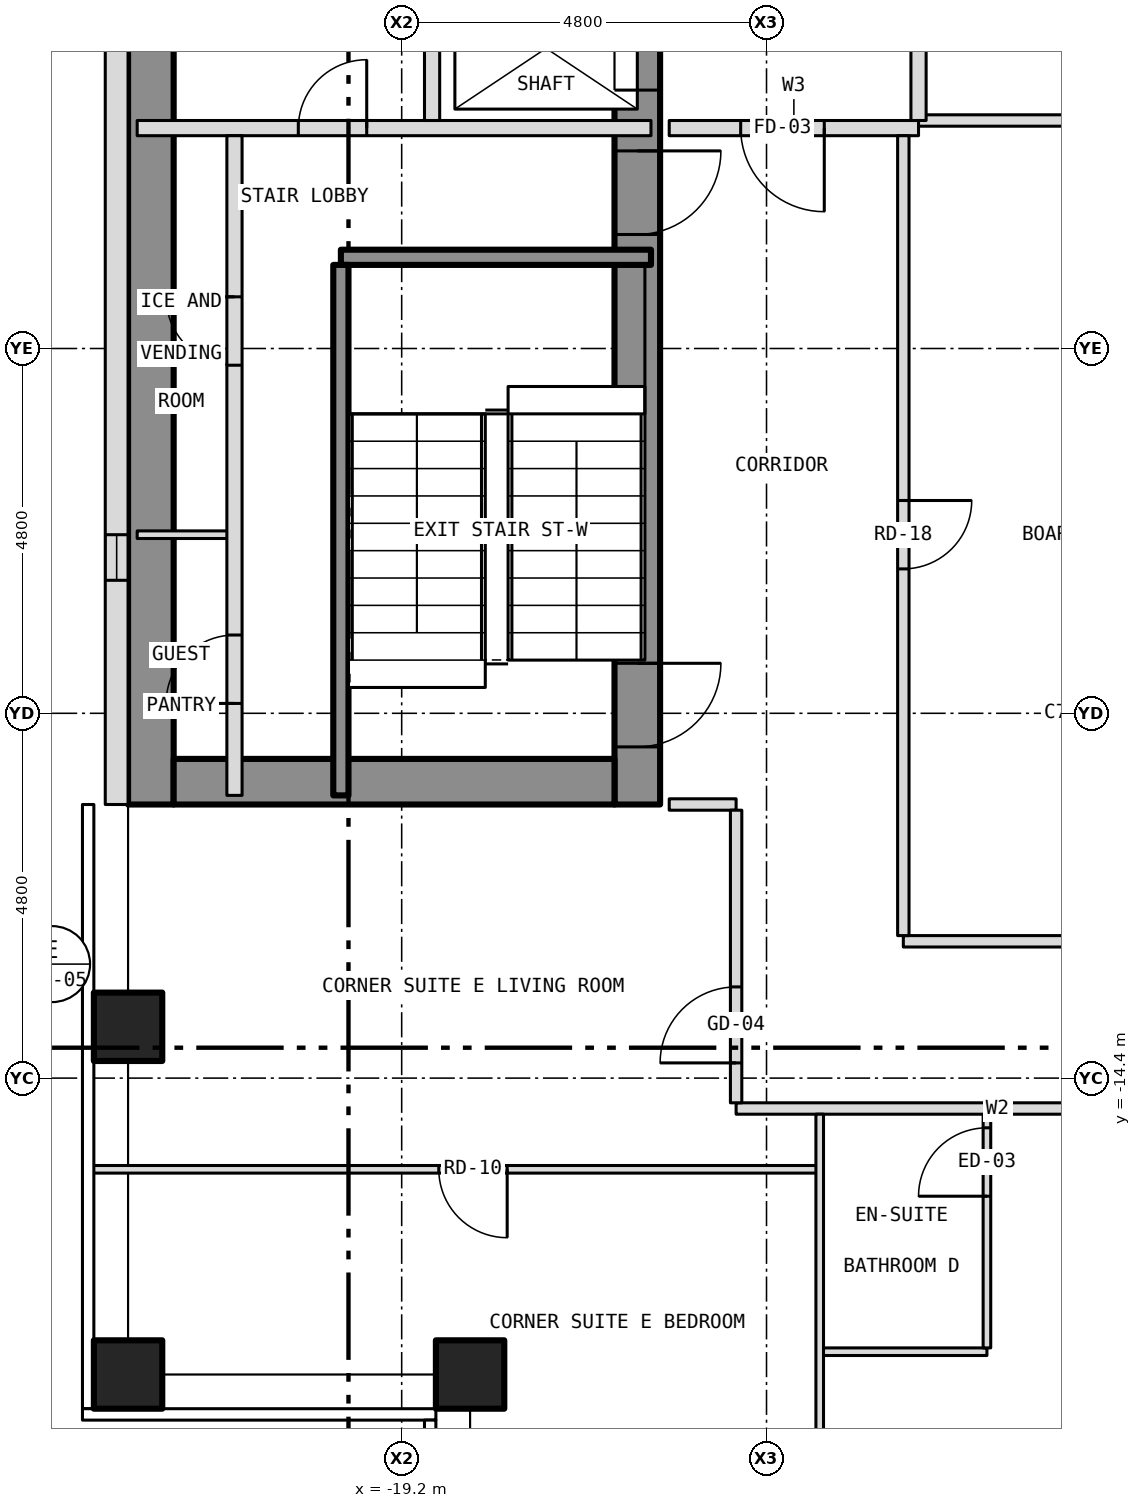
"""IFC4 building model, lengths in metres.
Left out: names, types, materials, properties, quantities, classifications, styles, units other than length and angle.
Written with IfcOpenShell. Run it as: python <this file> out.ifc"""

import sys

from ifc_helpers import new_model, si_unit, direction, frame, frame_2d, origin, origin_2d, place, context, subcontext, project, spatial, rectangle, hollow_rectangle, extrude, element, fill, save


model = new_model("IFC4")
c1 = context("Model", 3, precision=1e-05, world=origin(), true_north=direction((0.0, 1.0)))
c2 = subcontext(c1, "Body", "Model", "MODEL_VIEW")
j1 = project(units=[si_unit("LENGTHUNIT", "METRE"), si_unit("PLANEANGLEUNIT", "RADIAN")], contexts=[c1])
p1 = place(None, origin())
s1 = spatial("IfcSite", under=j1, at=p1, CompositionType="ELEMENT")
p2 = place(p1, origin())
s2 = spatial("IfcBuilding", under=s1, at=p2, CompositionType="ELEMENT")
p3 = place(p2, frame((0.0, 0.0, 134.5)))
s3 = spatial("IfcBuildingStorey", under=s2, at=p3, CompositionType="ELEMENT", Elevation=134.5)
for number, where, z_axis, x_axis in (
    (1, (-22.8, -18.3, -0.15), (0.0, 0.0, 1.0), (1.0, 0.0, 0.0)),
    (2, (-22.8, -13.725, -0.15), (0.0, 0.0, 1.0), (1.0, 0.0, 0.0)),
    (3, (-18.3, -18.3, -0.15), (0.0, 0.0, 1.0), (1.0, 0.0, 0.0)),
):
    element("IfcColumn", number, at=place(p3, frame(where, z_axis=z_axis, x_axis=x_axis)), inside=s3, PredefinedType="COLUMN", context=c2, shape_type="SweptSolid", body=[
        extrude(hollow_rectangle(XDim=0.9, YDim=0.9, WallThickness=0.05, at=origin_2d()), origin(), (0.0, 0.0, 1.0), 3.35),
    ])
p4 = place(p3, frame((-16.1, -10.8, 0.0), z_axis=(0.0, 0.0, 1.0), x_axis=(0.0, 1.0, 0.0)))
e4 = element("IfcWall", 4, at=p4, inside=s3, PredefinedType="SHEAR", context=c2, shape_type="SweptSolid", body=[
    extrude(rectangle(XDim=21.6, YDim=0.6, at=frame_2d((10.8, 0.0))), origin(), (0.0, 0.0, 1.0), 2.9),
])
p5 = place(p4, frame((9.4, 0.0, 0.0)))
e5 = element("IfcOpeningElement", 5, at=p5, cuts=e4, PredefinedType="OPENING", context=c2, shape_type="SweptSolid", body=[
    extrude(rectangle(XDim=1.1, YDim=2.1, at=frame_2d((0.55, 1.05))), frame((0.0, 0.312, 0.0), z_axis=(0.0, -1.0, 0.0), x_axis=(1.0, 0.0, 0.0)), (0.0, 0.0, 1.0), 0.624),
])
p6 = place(p4, frame((11.5, 0.0, 0.0)))
e6 = element("IfcOpeningElement", 6, at=p6, cuts=e4, PredefinedType="OPENING", context=c2, shape_type="SweptSolid", body=[
    extrude(rectangle(XDim=1.1, YDim=2.1, at=frame_2d((0.55, 1.05))), frame((0.0, 0.312, 0.0), z_axis=(0.0, -1.0, 0.0), x_axis=(1.0, 0.0, 0.0)), (0.0, 0.0, 1.0), 0.624),
])
p7 = place(p4, frame((13.6, 0.0, 0.0)))
e7 = element("IfcOpeningElement", 7, at=p7, cuts=e4, PredefinedType="OPENING", context=c2, shape_type="SweptSolid", body=[
    extrude(rectangle(XDim=1.1, YDim=2.1, at=frame_2d((0.55, 1.05))), frame((0.0, 0.312, 0.0), z_axis=(0.0, -1.0, 0.0), x_axis=(1.0, 0.0, 0.0)), (0.0, 0.0, 1.0), 0.624),
])
p8 = place(p4, frame((15.7, 0.0, 0.0)))
e8 = element("IfcOpeningElement", 8, at=p8, cuts=e4, PredefinedType="OPENING", context=c2, shape_type="SweptSolid", body=[
    extrude(rectangle(XDim=1.1, YDim=2.1, at=frame_2d((0.55, 1.05))), frame((0.0, 0.312, 0.0), z_axis=(0.0, -1.0, 0.0), x_axis=(1.0, 0.0, 0.0)), (0.0, 0.0, 1.0), 0.624),
])
p9 = place(p4, frame((17.8, 0.0, 0.0)))
e9 = element("IfcOpeningElement", 9, at=p9, cuts=e4, PredefinedType="OPENING", context=c2, shape_type="SweptSolid", body=[
    extrude(rectangle(XDim=1.1, YDim=2.1, at=frame_2d((0.55, 1.05))), frame((0.0, 0.312, 0.0), z_axis=(0.0, -1.0, 0.0), x_axis=(1.0, 0.0, 0.0)), (0.0, 0.0, 1.0), 0.624),
])
p10 = place(p4, frame((0.758, 0.0, 0.0)))
e10 = element("IfcOpeningElement", 10, at=p10, cuts=e4, PredefinedType="OPENING", context=c2, shape_type="SweptSolid", body=[
    extrude(rectangle(XDim=1.1, YDim=2.1, at=frame_2d((0.55, 1.05))), frame((0.0, 0.312, 0.0), z_axis=(0.0, -1.0, 0.0), x_axis=(1.0, 0.0, 0.0)), (0.0, 0.0, 1.0), 0.624),
])
p11 = place(p4, frame((7.5, 0.0, 0.0)))
e11 = element("IfcOpeningElement", 11, at=p11, cuts=e4, PredefinedType="OPENING", context=c2, shape_type="SweptSolid", body=[
    extrude(rectangle(XDim=1.1, YDim=2.1, at=frame_2d((0.55, 1.05))), frame((0.0, 0.312, 0.0), z_axis=(0.0, -1.0, 0.0), x_axis=(1.0, 0.0, 0.0)), (0.0, 0.0, 1.0), 0.624),
])
p12 = place(p3, frame((-22.5, -10.8, 0.0), z_axis=(0.0, 0.0, 1.0), x_axis=(0.0, 1.0, 0.0)))
e12 = element("IfcWall", 12, at=p12, inside=s3, PredefinedType="SHEAR", context=c2, shape_type="SweptSolid", body=[
    extrude(rectangle(XDim=21.6, YDim=0.6, at=frame_2d((10.8, 0.0))), origin(), (0.0, 0.0, 1.0), 2.9),
])
p13 = place(p3, frame((-22.2, -10.5, 0.0), z_axis=(0.0, 0.0, 1.0), x_axis=(1.0, 0.0, 0.0)))
e13 = element("IfcWall", 13, at=p13, inside=s3, PredefinedType="SHEAR", context=c2, shape_type="SweptSolid", body=[
    extrude(rectangle(XDim=5.8, YDim=0.6, at=frame_2d((2.9, 0.0))), origin(), (0.0, 0.0, 1.0), 2.9),
])
p14 = place(p3, frame((-22.95, 10.8, 0.0), z_axis=(0.0, 0.0, 1.0), x_axis=(0.0, -1.0, 0.0)))
e14 = element("IfcWall", 14, at=p14, inside=s3, PredefinedType="SOLIDWALL", context=c2, shape_type="SweptSolid", body=[
    extrude(rectangle(XDim=21.6, YDim=0.3, at=frame_2d((10.8, 0.0))), origin(), (0.0, 0.0, 1.0), 3.5),
])
p15 = place(p14, frame((18.05, 0.0, 1.0)))
e15 = element("IfcOpeningElement", 15, at=p15, cuts=e14, PredefinedType="OPENING", context=c2, shape_type="SweptSolid", body=[
    extrude(rectangle(XDim=0.6, YDim=1.5, at=frame_2d((0.3, 0.75))), frame((0.0, 0.162, 0.0), z_axis=(0.0, -1.0, 0.0), x_axis=(1.0, 0.0, 0.0)), (0.0, 0.0, 1.0), 0.324),
])
p16 = place(p3, frame((-13.7, -18.0, 0.0), z_axis=(0.0, 0.0, 1.0), x_axis=(1.0, 0.0, 0.0)))
e16 = element("IfcWall", 16, at=p16, inside=s3, PredefinedType="PARTITIONING", context=c2, shape_type="SweptSolid", body=[
    extrude(rectangle(XDim=2.2, YDim=0.1, at=frame_2d((1.1, 0.0))), origin(), (0.0, 0.0, 1.0), 3.2),
])
p17 = place(p3, frame((-23.28, -15.6, 0.0), z_axis=(0.0, 0.0, 1.0), x_axis=(1.0, 0.0, 0.0)))
e17 = element("IfcWall", 17, at=p17, inside=s3, PredefinedType="PARTITIONING", context=c2, shape_type="SweptSolid", body=[
    extrude(rectangle(XDim=9.58, YDim=0.1, at=frame_2d((4.79, 0.0))), origin(), (0.0, 0.0, 1.0), 3.2),
])
p18 = place(p17, frame((4.568, 0.0, 0.0)))
e18 = element("IfcOpeningElement", 18, at=p18, cuts=e17, PredefinedType="OPENING", context=c2, shape_type="SweptSolid", body=[
    extrude(rectangle(XDim=0.9, YDim=2.1, at=frame_2d((0.45, 1.05))), frame((0.0, 0.062, 0.0), z_axis=(0.0, -1.0, 0.0), x_axis=(1.0, 0.0, 0.0)), (0.0, 0.0, 1.0), 0.124),
])
p19 = place(p3, frame((-14.8, -14.8, 0.0), z_axis=(0.0, 0.0, 1.0), x_axis=(1.0, 0.0, 0.0)))
e19 = element("IfcWall", 19, at=p19, inside=s3, PredefinedType="PARTITIONING", context=c2, shape_type="SweptSolid", body=[
    extrude(rectangle(XDim=6.88, YDim=0.15, at=frame_2d((3.44, 0.0))), origin(), (0.0, 0.0, 1.0), 3.2),
])
p20 = place(p19, frame((4.562, 0.0, 0.0)))
e20 = element("IfcOpeningElement", 20, at=p20, cuts=e19, PredefinedType="OPENING", context=c2, shape_type="SweptSolid", body=[
    extrude(rectangle(XDim=1.0, YDim=2.1, at=frame_2d((0.5, 1.05))), frame((0.0, 0.087, 0.0), z_axis=(0.0, -1.0, 0.0), x_axis=(1.0, 0.0, 0.0)), (0.0, 0.0, 1.0), 0.174),
])
p21 = place(p3, frame((-12.6, -12.6, 0.0), z_axis=(0.0, 0.0, 1.0), x_axis=(1.0, 0.0, 0.0)))
e21 = element("IfcWall", 21, at=p21, inside=s3, PredefinedType="PARTITIONING", context=c2, shape_type="SweptSolid", body=[
    extrude(rectangle(XDim=4.68, YDim=0.15, at=frame_2d((2.34, 0.0))), origin(), (0.0, 0.0, 1.0), 3.2),
])
p22 = place(p3, frame((-15.68, -10.8, 0.0), z_axis=(0.0, 0.0, 1.0), x_axis=(1.0, 0.0, 0.0)))
e22 = element("IfcWall", 22, at=p22, inside=s3, PredefinedType="PARTITIONING", context=c2, shape_type="SweptSolid", body=[
    extrude(rectangle(XDim=0.88, YDim=0.15, at=frame_2d((0.44, 0.0))), origin(), (0.0, 0.0, 1.0), 3.2),
])
p23 = place(p3, frame((-22.68, -7.25, 0.0), z_axis=(0.0, 0.0, 1.0), x_axis=(1.0, 0.0, 0.0)))
e23 = element("IfcWall", 23, at=p23, inside=s3, PredefinedType="PARTITIONING", context=c2, shape_type="SweptSolid", body=[
    extrude(rectangle(XDim=1.28, YDim=0.1, at=frame_2d((0.64, 0.0))), origin(), (0.0, 0.0, 1.0), 2.9),
])
p24 = place(p3, frame((-20.0, -3.6, 0.0), z_axis=(0.0, 0.0, 1.0), x_axis=(1.0, 0.0, 0.0)))
e24 = element("IfcWall", 24, at=p24, inside=s3, PredefinedType="SHEAR", context=c2, shape_type="SweptSolid", body=[
    extrude(rectangle(XDim=4.08, YDim=0.2, at=frame_2d((2.04, 0.0))), origin(), (0.0, 0.0, 1.0), 2.9),
])
p25 = place(p3, frame((-22.68, -1.9, 0.0), z_axis=(0.0, 0.0, 1.0), x_axis=(1.0, 0.0, 0.0)))
e25 = element("IfcWall", 25, at=p25, inside=s3, PredefinedType="PARTITIONING", context=c2, shape_type="SweptSolid", body=[
    extrude(rectangle(XDim=6.76, YDim=0.2, at=frame_2d((3.38, 0.0))), origin(), (0.0, 0.0, 1.0), 2.9),
])
p26 = place(p25, frame((2.12, 0.0, 0.0)))
e26 = element("IfcOpeningElement", 26, at=p26, cuts=e25, PredefinedType="OPENING", context=c2, shape_type="SweptSolid", body=[
    extrude(rectangle(XDim=0.9, YDim=2.1, at=frame_2d((0.45, 1.05))), frame((0.0, 0.112, 0.0), z_axis=(0.0, -1.0, 0.0), x_axis=(1.0, 0.0, 0.0)), (0.0, 0.0, 1.0), 0.224),
])
p27 = place(p3, frame((-15.68, -1.9, 0.0), z_axis=(0.0, 0.0, 1.0), x_axis=(1.0, 0.0, 0.0)))
e27 = element("IfcWall", 27, at=p27, inside=s3, PredefinedType="PARTITIONING", context=c2, shape_type="SweptSolid", body=[
    extrude(rectangle(XDim=3.28, YDim=0.2, at=frame_2d((1.64, 0.0))), origin(), (0.0, 0.0, 1.0), 3.2),
])
p28 = place(p27, frame((0.94, 0.0, 0.0)))
e28 = element("IfcOpeningElement", 28, at=p28, cuts=e27, PredefinedType="OPENING", context=c2, shape_type="SweptSolid", body=[
    extrude(rectangle(XDim=1.1, YDim=2.1, at=frame_2d((0.55, 1.05))), frame((0.0, 0.112, 0.0), z_axis=(0.0, -1.0, 0.0), x_axis=(1.0, 0.0, 0.0)), (0.0, 0.0, 1.0), 0.224),
])
p29 = place(p3, frame((-12.4, -1.8, 0.0), z_axis=(0.0, 0.0, 1.0), x_axis=(1.0, 0.0, 0.0)))
e29 = element("IfcWall", 29, at=p29, inside=s3, PredefinedType="PARTITIONING", context=c2, shape_type="SweptSolid", body=[
    extrude(rectangle(XDim=4.48, YDim=0.15, at=frame_2d((2.24, 0.0))), origin(), (0.0, 0.0, 1.0), 3.2),
])
p30 = place(p3, frame((-21.4, -10.68, 0.0), z_axis=(0.0, 0.0, 1.0), x_axis=(0.0, 1.0, 0.0)))
e30 = element("IfcWall", 30, at=p30, inside=s3, PredefinedType="PARTITIONING", context=c2, shape_type="SweptSolid", body=[
    extrude(rectangle(XDim=8.68, YDim=0.2, at=frame_2d((4.34, 0.0))), origin(), (0.0, 0.0, 1.0), 2.9),
])
p31 = place(p30, frame((1.21, 0.0, 0.0)))
e31 = element("IfcOpeningElement", 31, at=p31, cuts=e30, PredefinedType="OPENING", context=c2, shape_type="SweptSolid", body=[
    extrude(rectangle(XDim=0.9, YDim=2.1, at=frame_2d((0.45, 1.05))), frame((0.0, 0.112, 0.0), z_axis=(0.0, -1.0, 0.0), x_axis=(1.0, 0.0, 0.0)), (0.0, 0.0, 1.0), 0.224),
])
p32 = place(p30, frame((5.66, 0.0, 0.0)))
e32 = element("IfcOpeningElement", 32, at=p32, cuts=e30, PredefinedType="OPENING", context=c2, shape_type="SweptSolid", body=[
    extrude(rectangle(XDim=0.9, YDim=2.1, at=frame_2d((0.45, 1.05))), frame((0.0, 0.112, 0.0), z_axis=(0.0, -1.0, 0.0), x_axis=(1.0, 0.0, 0.0)), (0.0, 0.0, 1.0), 0.224),
])
p33 = place(p3, frame((-20.0, -10.68, 0.0), z_axis=(0.0, 0.0, 1.0), x_axis=(0.0, 1.0, 0.0)))
e33 = element("IfcWall", 33, at=p33, inside=s3, PredefinedType="SHEAR", context=c2, shape_type="SweptSolid", body=[
    extrude(rectangle(XDim=6.98, YDim=0.2, at=frame_2d((3.49, 0.0))), origin(), (0.0, 0.0, 1.0), 2.9),
])
p34 = place(p3, frame((-18.8, -1.8, 0.0), z_axis=(0.0, 0.0, 1.0), x_axis=(0.0, 1.0, 0.0)))
e34 = element("IfcWall", 34, at=p34, inside=s3, PredefinedType="PARTITIONING", context=c2, shape_type="SweptSolid", body=[
    extrude(rectangle(XDim=6.15, YDim=0.2, at=frame_2d((3.075, 0.0))), origin(), (0.0, 0.0, 1.0), 2.9),
])
p35 = place(p3, frame((-14.8, -14.725, 0.0), z_axis=(0.0, 0.0, 1.0), x_axis=(0.0, 1.0, 0.0)))
e35 = element("IfcWall", 35, at=p35, inside=s3, PredefinedType="PARTITIONING", context=c2, shape_type="SweptSolid", body=[
    extrude(rectangle(XDim=3.85, YDim=0.15, at=frame_2d((1.925, 0.0))), origin(), (0.0, 0.0, 1.0), 3.2),
])
p36 = place(p35, frame((0.525, 0.0, 0.0)))
e36 = element("IfcOpeningElement", 36, at=p36, cuts=e35, PredefinedType="OPENING", context=c2, shape_type="SweptSolid", body=[
    extrude(rectangle(XDim=1.0, YDim=2.1, at=frame_2d((0.5, 1.05))), frame((0.0, 0.087, 0.0), z_axis=(0.0, -1.0, 0.0), x_axis=(1.0, 0.0, 0.0)), (0.0, 0.0, 1.0), 0.174),
])
p37 = place(p3, frame((-13.7, -22.68, 0.0), z_axis=(0.0, 0.0, 1.0), x_axis=(0.0, 1.0, 0.0)))
e37 = element("IfcWall", 37, at=p37, inside=s3, PredefinedType="PARTITIONING", context=c2, shape_type="SweptSolid", body=[
    extrude(rectangle(XDim=7.805, YDim=0.1, at=frame_2d((3.902, 0.0))), origin(), (0.0, 0.0, 1.0), 3.2),
])
p38 = place(p3, frame((-12.6, -12.525, 0.0), z_axis=(0.0, 0.0, 1.0), x_axis=(0.0, 1.0, 0.0)))
e38 = element("IfcWall", 38, at=p38, inside=s3, PredefinedType="PARTITIONING", context=c2, shape_type="SweptSolid", body=[
    extrude(rectangle(XDim=10.525, YDim=0.15, at=frame_2d((5.262, 0.0))), origin(), (0.0, 0.0, 1.0), 3.2),
])
p39 = place(p38, frame((4.825, 0.0, 0.0)))
e39 = element("IfcOpeningElement", 39, at=p39, cuts=e38, PredefinedType="OPENING", context=c2, shape_type="SweptSolid", body=[
    extrude(rectangle(XDim=0.9, YDim=2.1, at=frame_2d((0.45, 1.05))), frame((0.0, 0.087, 0.0), z_axis=(0.0, -1.0, 0.0), x_axis=(1.0, 0.0, 0.0)), (0.0, 0.0, 1.0), 0.174),
])
p40 = place(p3, frame((-12.4, -1.8, 0.0), z_axis=(0.0, 0.0, 1.0), x_axis=(0.0, 1.0, 0.0)))
e40 = element("IfcWall", 40, at=p40, inside=s3, PredefinedType="PARTITIONING", context=c2, shape_type="SweptSolid", body=[
    extrude(rectangle(XDim=4.0, YDim=0.2, at=frame_2d((2.0, 0.0))), origin(), (0.0, 0.0, 1.0), 3.2),
])
p41 = place(p40, frame((1.25, 0.0, 0.0)))
e41 = element("IfcOpeningElement", 41, at=p41, cuts=e40, PredefinedType="OPENING", context=c2, shape_type="SweptSolid", body=[
    extrude(rectangle(XDim=1.1, YDim=2.1, at=frame_2d((0.55, 1.05))), frame((0.0, 0.112, 0.0), z_axis=(0.0, -1.0, 0.0), x_axis=(1.0, 0.0, 0.0)), (0.0, 0.0, 1.0), 0.224),
])
p42 = place(p3, frame((-11.5, -17.95, 0.0), z_axis=(0.0, 0.0, 1.0), x_axis=(0.0, 1.0, 0.0)))
e42 = element("IfcWall", 42, at=p42, inside=s3, PredefinedType="PARTITIONING", context=c2, shape_type="SweptSolid", body=[
    extrude(rectangle(XDim=3.075, YDim=0.1, at=frame_2d((1.538, 0.0))), origin(), (0.0, 0.0, 1.0), 3.2),
])
p43 = place(p42, frame((1.996, 0.0, 0.0)))
e43 = element("IfcOpeningElement", 43, at=p43, cuts=e42, PredefinedType="OPENING", context=c2, shape_type="SweptSolid", body=[
    extrude(rectangle(XDim=0.9, YDim=2.1, at=frame_2d((0.45, 1.05))), frame((0.0, 0.062, 0.0), z_axis=(0.0, -1.0, 0.0), x_axis=(1.0, 0.0, 0.0)), (0.0, 0.0, 1.0), 0.124),
])
p44 = place(p15, origin())
e44 = element("IfcWindow", 44, at=p44, inside=s3, PartitioningType="SINGLE_PANEL", PredefinedType="WINDOW", context=c2, shape_type="SweptSolid", body=[
    extrude(rectangle(XDim=0.6, YDim=1.5, at=frame_2d((0.3, 0.75))), frame((0.0, -0.06, 0.0), z_axis=(0.0, -1.0, 0.0), x_axis=(1.0, 0.0, 0.0)), (0.0, 0.0, 1.0), 0.06),
])
fill(e15, e44)
p45 = place(p5, origin())
e45 = element("IfcDoor", 45, at=p45, inside=s3, OperationType="SLIDING_TO_LEFT", PredefinedType="DOOR", context=c2, shape_type="SweptSolid", body=[
    extrude(rectangle(XDim=1.1, YDim=2.1, at=frame_2d((0.55, 1.05))), frame((0.0, 0.025, 0.0), z_axis=(0.0, -1.0, 0.0), x_axis=(1.0, 0.0, 0.0)), (0.0, 0.0, 1.0), 0.05),
])
fill(e5, e45)
p46 = place(p10, origin())
e46 = element("IfcDoor", 46, at=p46, inside=s3, OperationType="SINGLE_SWING_RIGHT", PredefinedType="DOOR", context=c2, shape_type="SweptSolid", body=[
    extrude(rectangle(XDim=1.1, YDim=2.1, at=frame_2d((0.55, 1.05))), frame((0.0, 0.025, 0.0), z_axis=(0.0, -1.0, 0.0), x_axis=(1.0, 0.0, 0.0)), (0.0, 0.0, 1.0), 0.05),
])
fill(e10, e46)
p47 = place(p11, origin())
e47 = element("IfcDoor", 47, at=p47, inside=s3, OperationType="SINGLE_SWING_RIGHT", PredefinedType="DOOR", context=c2, shape_type="SweptSolid", body=[
    extrude(rectangle(XDim=1.1, YDim=2.1, at=frame_2d((0.55, 1.05))), frame((0.0, 0.025, 0.0), z_axis=(0.0, -1.0, 0.0), x_axis=(1.0, 0.0, 0.0)), (0.0, 0.0, 1.0), 0.05),
])
fill(e11, e47)
p48 = place(p31, origin())
e48 = element("IfcDoor", 48, at=p48, inside=s3, OperationType="SINGLE_SWING_LEFT", PredefinedType="DOOR", context=c2, shape_type="SweptSolid", body=[
    extrude(rectangle(XDim=0.9, YDim=2.1, at=frame_2d((0.45, 1.05))), frame((0.0, 0.025, 0.0), z_axis=(0.0, -1.0, 0.0), x_axis=(1.0, 0.0, 0.0)), (0.0, 0.0, 1.0), 0.05),
])
fill(e31, e48)
p49 = place(p32, origin())
e49 = element("IfcDoor", 49, at=p49, inside=s3, OperationType="SINGLE_SWING_RIGHT", PredefinedType="DOOR", context=c2, shape_type="SweptSolid", body=[
    extrude(rectangle(XDim=0.9, YDim=2.1, at=frame_2d((0.45, 1.05))), frame((0.0, 0.025, 0.0), z_axis=(0.0, -1.0, 0.0), x_axis=(1.0, 0.0, 0.0)), (0.0, 0.0, 1.0), 0.05),
])
fill(e32, e49)
p50 = place(p26, origin())
e50 = element("IfcDoor", 50, at=p50, inside=s3, OperationType="SINGLE_SWING_RIGHT", PredefinedType="DOOR", context=c2, shape_type="SweptSolid", body=[
    extrude(rectangle(XDim=0.9, YDim=2.1, at=frame_2d((0.45, 1.05))), frame((0.0, 0.025, 0.0), z_axis=(0.0, -1.0, 0.0), x_axis=(1.0, 0.0, 0.0)), (0.0, 0.0, 1.0), 0.05),
])
fill(e26, e50)
p51 = place(p28, origin())
e51 = element("IfcDoor", 51, at=p51, inside=s3, OperationType="SINGLE_SWING_RIGHT", PredefinedType="DOOR", context=c2, shape_type="SweptSolid", body=[
    extrude(rectangle(XDim=1.1, YDim=2.1, at=frame_2d((0.55, 1.05))), frame((0.0, 0.025, 0.0), z_axis=(0.0, -1.0, 0.0), x_axis=(1.0, 0.0, 0.0)), (0.0, 0.0, 1.0), 0.05),
])
fill(e28, e51)
p52 = place(p43, origin())
e52 = element("IfcDoor", 52, at=p52, inside=s3, OperationType="SINGLE_SWING_LEFT", PredefinedType="DOOR", context=c2, shape_type="SweptSolid", body=[
    extrude(rectangle(XDim=0.9, YDim=2.1, at=frame_2d((0.45, 1.05))), frame((0.0, 0.025, 0.0), z_axis=(0.0, -1.0, 0.0), x_axis=(1.0, 0.0, 0.0)), (0.0, 0.0, 1.0), 0.05),
])
fill(e43, e52)
p53 = place(p36, origin())
e53 = element("IfcDoor", 53, at=p53, inside=s3, OperationType="SINGLE_SWING_LEFT", PredefinedType="DOOR", context=c2, shape_type="SweptSolid", body=[
    extrude(rectangle(XDim=1.0, YDim=2.1, at=frame_2d((0.5, 1.05))), frame((0.0, 0.025, 0.0), z_axis=(0.0, -1.0, 0.0), x_axis=(1.0, 0.0, 0.0)), (0.0, 0.0, 1.0), 0.05),
])
fill(e36, e53)
p54 = place(p18, origin())
e54 = element("IfcDoor", 54, at=p54, inside=s3, OperationType="SINGLE_SWING_RIGHT", PredefinedType="DOOR", context=c2, shape_type="SweptSolid", body=[
    extrude(rectangle(XDim=0.9, YDim=2.1, at=frame_2d((0.45, 1.05))), frame((0.0, 0.025, 0.0), z_axis=(0.0, -1.0, 0.0), x_axis=(1.0, 0.0, 0.0)), (0.0, 0.0, 1.0), 0.05),
])
fill(e18, e54)
p55 = place(p39, origin())
e55 = element("IfcDoor", 55, at=p55, inside=s3, OperationType="SINGLE_SWING_RIGHT", PredefinedType="DOOR", context=c2, shape_type="SweptSolid", body=[
    extrude(rectangle(XDim=0.9, YDim=2.1, at=frame_2d((0.45, 1.05))), frame((0.0, 0.025, 0.0), z_axis=(0.0, -1.0, 0.0), x_axis=(1.0, 0.0, 0.0)), (0.0, 0.0, 1.0), 0.05),
])
fill(e39, e55)
save(model, sys.argv[1])
